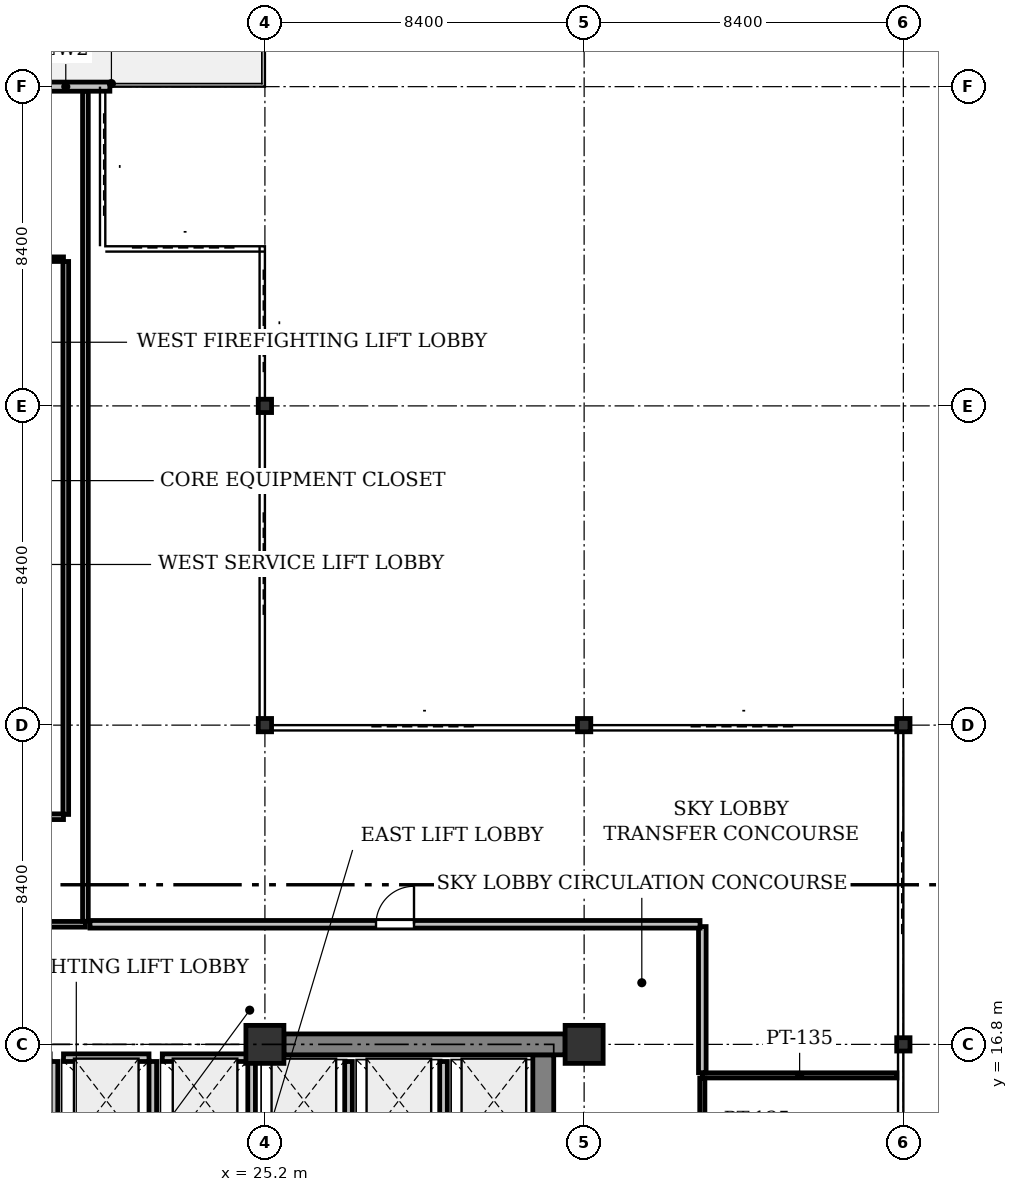
"""IFC4 building model, lengths in metres.
Left out: names, types, materials, properties, quantities, classifications, styles, units other than length and angle.
Written with IfcOpenShell. Run it as: python <this file> out.ifc"""

import sys

from ifc_helpers import new_model, si_unit, direction, frame, frame_2d, origin, origin_2d, place, context, subcontext, project, spatial, rectangle, i_section, extrude, element, fill, save


model = new_model("IFC4")
c1 = context("Model", 3, precision=1e-05, world=origin(), true_north=direction((0.0, 1.0)))
c2 = subcontext(c1, "Body", "Model", "MODEL_VIEW")
j1 = project(units=[si_unit("LENGTHUNIT", "METRE"), si_unit("PLANEANGLEUNIT", "RADIAN")], contexts=[c1])
p1 = place(None, origin())
s1 = spatial("IfcSite", under=j1, at=p1, CompositionType="ELEMENT")
p2 = place(p1, origin())
s2 = spatial("IfcBuilding", under=s1, at=p2, CompositionType="ELEMENT")
p3 = place(p2, frame((0.0, 0.0, 220.6)))
s3 = spatial("IfcBuildingStorey", under=s2, at=p3, CompositionType="ELEMENT", Elevation=220.6)
p4 = place(p3, frame((25.2, 16.8, 0.0), z_axis=(0.0, 0.0, 1.0), x_axis=(1.0, 0.0, 0.0)))
e1 = element("IfcColumn", 1, at=p4, inside=s3, PredefinedType="COLUMN", context=c2, shape_type="SweptSolid", body=[
    extrude(rectangle(XDim=1.0, YDim=1.0, at=origin_2d()), origin(), (0.0, 0.0, 1.0), 4.1),
])
for number, where, z_axis, x_axis in (
    (2, (25.2, 25.2, 0.0), (0.0, 0.0, 1.0), (1.0, 0.0, 0.0)),
    (3, (25.2, 33.6, 0.0), (0.0, 0.0, 1.0), (1.0, 0.0, 0.0)),
):
    element("IfcColumn", number, at=place(p3, frame(where, z_axis=z_axis, x_axis=x_axis)), inside=s3, PredefinedType="COLUMN", context=c2, shape_type="SweptSolid", body=[
        extrude(i_section(OverallWidth=0.35, OverallDepth=0.35, WebThickness=0.02, FlangeThickness=0.032, at=origin_2d()), origin(), (0.0, 0.0, 1.0), 4.1),
    ])
p5 = place(p3, frame((33.6, 16.8, 0.0), z_axis=(0.0, 0.0, 1.0), x_axis=(1.0, 0.0, 0.0)))
e4 = element("IfcColumn", 4, at=p5, inside=s3, PredefinedType="COLUMN", context=c2, shape_type="SweptSolid", body=[
    extrude(rectangle(XDim=1.0, YDim=1.0, at=origin_2d()), origin(), (0.0, 0.0, 1.0), 4.1),
])
for number, where, z_axis, x_axis in (
    (5, (33.6, 25.2, 0.0), (0.0, 0.0, 1.0), (1.0, 0.0, 0.0)),
    (6, (42.0, 16.8, 0.0), (0.0, 0.0, 1.0), (1.0, 0.0, 0.0)),
    (7, (42.0, 25.2, 0.0), (0.0, 0.0, 1.0), (1.0, 0.0, 0.0)),
):
    element("IfcColumn", number, at=place(p3, frame(where, z_axis=z_axis, x_axis=x_axis)), inside=s3, PredefinedType="COLUMN", context=c2, shape_type="SweptSolid", body=[
        extrude(i_section(OverallWidth=0.35, OverallDepth=0.35, WebThickness=0.02, FlangeThickness=0.032, at=origin_2d()), origin(), (0.0, 0.0, 1.0), 4.1),
    ])
p6 = place(p3, frame((17.3, 42.0, 0.0), z_axis=(0.0, 0.0, 1.0), x_axis=(1.0, 0.0, 0.0)))
e8 = element("IfcWall", 8, at=p6, inside=s3, PredefinedType="STANDARD", context=c2, shape_type="SweptSolid", body=[
    extrude(rectangle(XDim=3.82, YDim=0.24, at=frame_2d((1.91, 0.0))), origin(), (0.0, 0.0, 1.0), 3.825),
])
p7 = place(p6, frame((0.3, 0.0, 0.0)))
e9 = element("IfcOpeningElement", 9, at=p7, cuts=e8, PredefinedType="OPENING", context=c2, shape_type="SweptSolid", body=[
    extrude(rectangle(XDim=1.2, YDim=2.2, at=frame_2d((0.6, 1.1))), frame((0.0, 0.13, 0.0), z_axis=(0.0, -1.0, 0.0), x_axis=(1.0, 0.0, 0.0)), (0.0, 0.0, 1.0), 0.26),
])
p8 = place(p3, frame((32.525, 8.675, 0.0), z_axis=(0.0, 0.0, 1.0), x_axis=(0.0, 1.0, 0.0)))
e10 = element("IfcWall", 10, at=p8, inside=s3, PredefinedType="SHEAR", context=c2, shape_type="SweptSolid", body=[
    extrude(rectangle(XDim=7.85, YDim=0.55, at=frame_2d((3.925, 0.0))), origin(), (0.0, 0.0, 1.0), 3.825),
])
p9 = place(p8, frame((4.025, 0.0, 0.0)))
e11 = element("IfcOpeningElement", 11, at=p9, cuts=e10, PredefinedType="OPENING", context=c2, shape_type="SweptSolid", body=[
    extrude(rectangle(XDim=1.1, YDim=2.15, at=frame_2d((0.55, 1.075))), frame((0.0, 0.285, 0.0), z_axis=(0.0, -1.0, 0.0), x_axis=(1.0, 0.0, 0.0)), (0.0, 0.0, 1.0), 0.57),
])
p10 = place(p3, frame((25.7, 16.8, 0.0), z_axis=(0.0, 0.0, 1.0), x_axis=(1.0, 0.0, 0.0)))
e12 = element("IfcWall", 12, at=p10, inside=s3, PredefinedType="SHEAR", context=c2, shape_type="SweptSolid", body=[
    extrude(rectangle(XDim=7.4, YDim=0.55, at=frame_2d((3.7, 0.0))), origin(), (0.0, 0.0, 1.0), 3.825),
])
for number, where, z_axis, x_axis in (
    (13, (19.65, 14.3, 0.0), (0.0, 0.0, 1.0), (0.0, 1.0, 0.0)),
    (14, (22.25, 14.3, 0.0), (0.0, 0.0, 1.0), (0.0, 1.0, 0.0)),
):
    element("IfcWall", number, at=place(p3, frame(where, z_axis=z_axis, x_axis=x_axis)), inside=s3, PredefinedType="PARTITIONING", context=c2, shape_type="SweptSolid", body=[
        extrude(rectangle(XDim=2.05, YDim=0.2, at=frame_2d((1.025, 0.0))), origin(), (0.0, 0.0, 1.0), 3.825),
    ])
p11 = place(p3, frame((19.9, 16.45, 0.0), z_axis=(0.0, 0.0, 1.0), x_axis=(1.0, 0.0, 0.0)))
e15 = element("IfcWall", 15, at=p11, inside=s3, PredefinedType="PARTITIONING", context=c2, shape_type="SweptSolid", body=[
    extrude(rectangle(XDim=2.25, YDim=0.2, at=frame_2d((1.125, 0.0))), origin(), (0.0, 0.0, 1.0), 3.825),
])
p12 = place(p3, frame((24.85, 14.3, 0.0), z_axis=(0.0, 0.0, 1.0), x_axis=(0.0, 1.0, 0.0)))
e16 = element("IfcWall", 16, at=p12, inside=s3, PredefinedType="PARTITIONING", context=c2, shape_type="SweptSolid", body=[
    extrude(rectangle(XDim=2.05, YDim=0.2, at=frame_2d((1.025, 0.0))), origin(), (0.0, 0.0, 1.0), 3.825),
])
p13 = place(p3, frame((22.5, 16.45, 0.0), z_axis=(0.0, 0.0, 1.0), x_axis=(1.0, 0.0, 0.0)))
e17 = element("IfcWall", 17, at=p13, inside=s3, PredefinedType="PARTITIONING", context=c2, shape_type="SweptSolid", body=[
    extrude(rectangle(XDim=2.25, YDim=0.2, at=frame_2d((1.125, 0.0))), origin(), (0.0, 0.0, 1.0), 3.825),
])
for number, where, z_axis, x_axis in (
    (18, (27.4, 14.3, 0.0), (0.0, 0.0, 1.0), (0.0, 1.0, 0.0)),
    (19, (29.9, 14.3, 0.0), (0.0, 0.0, 1.0), (0.0, 1.0, 0.0)),
):
    element("IfcWall", number, at=place(p3, frame(where, z_axis=z_axis, x_axis=x_axis)), inside=s3, PredefinedType="PARTITIONING", context=c2, shape_type="SweptSolid", body=[
        extrude(rectangle(XDim=2.05, YDim=0.2, at=frame_2d((1.025, 0.0))), origin(), (0.0, 0.0, 1.0), 3.825),
    ])
p14 = place(p3, frame((41.831, 15.984, 0.0), z_axis=(0.0, 0.0, 1.0), x_axis=(-1.0, 0.0, 0.0)))
e20 = element("IfcWall", 20, at=p14, inside=s3, PredefinedType="PARTITIONING", context=c2, shape_type="SweptSolid", body=[
    extrude(rectangle(XDim=5.121, YDim=0.135, at=frame_2d((2.561, 0.0))), origin(), (0.0, 0.0, 1.0), 3.518),
])
p15 = place(p3, frame((36.71, 15.913, 0.0), z_axis=(0.0, 0.0, 1.0), x_axis=(0.0, -1.0, 0.0)))
e21 = element("IfcWall", 21, at=p15, inside=s3, PredefinedType="PARTITIONING", context=c2, shape_type="SweptSolid", body=[
    extrude(rectangle(XDim=5.404, YDim=0.135, at=frame_2d((2.702, 0.0))), origin(), (0.0, 0.0, 1.0), 3.825),
])
p16 = place(p15, frame((2.227, 0.0, 0.0)))
e22 = element("IfcOpeningElement", 22, at=p16, cuts=e21, PredefinedType="OPENING", context=c2, shape_type="SweptSolid", body=[
    extrude(rectangle(XDim=0.95, YDim=2.15, at=frame_2d((0.475, 1.075))), frame((0.0, 0.077, 0.0), z_axis=(0.0, -1.0, 0.0), x_axis=(1.0, 0.0, 0.0)), (0.0, 0.0, 1.0), 0.155),
])
p17 = place(p3, frame((7.774, 19.96, 0.0), z_axis=(0.0, 0.0, 1.0), x_axis=(1.0, 0.0, 0.0)))
e23 = element("IfcWall", 23, at=p17, inside=s3, PredefinedType="PARTITIONING", context=c2, shape_type="SweptSolid", body=[
    extrude(rectangle(XDim=12.703, YDim=0.15, at=frame_2d((6.352, 0.0))), origin(), (0.0, 0.0, 1.0), 3.371),
])
p18 = place(p17, frame((5.876, 0.0, 0.0)))
e24 = element("IfcOpeningElement", 24, at=p18, cuts=e23, PredefinedType="OPENING", context=c2, shape_type="SweptSolid", body=[
    extrude(rectangle(XDim=0.95, YDim=2.15, at=frame_2d((0.475, 1.075))), frame((0.0, 0.085, 0.0), z_axis=(0.0, -1.0, 0.0), x_axis=(1.0, 0.0, 0.0)), (0.0, 0.0, 1.0), 0.17),
])
p19 = place(p3, frame((20.477, 20.039, 0.0), z_axis=(0.0, 0.0, 1.0), x_axis=(0.0, 1.0, 0.0)))
e25 = element("IfcWall", 25, at=p19, inside=s3, PredefinedType="PARTITIONING", context=c2, shape_type="SweptSolid", body=[
    extrude(rectangle(XDim=21.837, YDim=0.15, at=frame_2d((10.918, 0.0))), origin(), (0.0, 0.0, 1.0), 3.365),
])
p20 = place(p3, frame((17.6, 37.46, 0.0), z_axis=(0.0, 0.0, 1.0), x_axis=(1.0, 0.0, 0.0)))
e26 = element("IfcWall", 26, at=p20, inside=s3, PredefinedType="PARTITIONING", context=c2, shape_type="SweptSolid", body=[
    extrude(rectangle(XDim=2.3, YDim=0.12, at=frame_2d((1.15, 0.0))), origin(), (0.0, 0.0, 1.0), 3.825),
])
p21 = place(p3, frame((19.96, 37.4, 0.0), z_axis=(0.0, 0.0, 1.0), x_axis=(0.0, -1.0, 0.0)))
e27 = element("IfcWall", 27, at=p21, inside=s3, PredefinedType="PARTITIONING", context=c2, shape_type="SweptSolid", body=[
    extrude(rectangle(XDim=14.55, YDim=0.15, at=frame_2d((7.275, 0.0))), origin(), (0.0, 0.0, 1.0), 3.365),
])
p22 = place(p3, frame((19.9, 22.79, 0.0), z_axis=(0.0, 0.0, 1.0), x_axis=(-1.0, 0.0, 0.0)))
e28 = element("IfcWall", 28, at=p22, inside=s3, PredefinedType="PARTITIONING", context=c2, shape_type="SweptSolid", body=[
    extrude(rectangle(XDim=12.126, YDim=0.15, at=frame_2d((6.063, 0.0))), origin(), (0.0, 0.0, 1.0), 3.371),
])
p23 = place(p3, frame((36.71, 19.9, 0.0), z_axis=(0.0, 0.0, 1.0), x_axis=(0.0, -1.0, 0.0)))
e29 = element("IfcWall", 29, at=p23, inside=s3, PredefinedType="PARTITIONING", context=c2, shape_type="SweptSolid", body=[
    extrude(rectangle(XDim=3.844, YDim=0.2, at=frame_2d((1.922, 0.0))), origin(), (0.0, 0.0, 1.0), 3.365),
])
p24 = place(p3, frame((20.597, 19.96, 0.0), z_axis=(0.0, 0.0, 1.0), x_axis=(1.0, 0.0, 0.0)))
e30 = element("IfcWall", 30, at=p24, inside=s3, PredefinedType="PARTITIONING", context=c2, shape_type="SweptSolid", body=[
    extrude(rectangle(XDim=16.053, YDim=0.2, at=frame_2d((8.027, 0.0))), origin(), (0.0, 0.0, 1.0), 3.371),
])
p25 = place(p24, frame((7.527, 0.0, 0.0)))
e31 = element("IfcOpeningElement", 31, at=p25, cuts=e30, PredefinedType="OPENING", context=c2, shape_type="SweptSolid", body=[
    extrude(rectangle(XDim=1.0, YDim=2.15, at=frame_2d((0.5, 1.075))), frame((0.0, 0.11, 0.0), z_axis=(0.0, -1.0, 0.0), x_axis=(1.0, 0.0, 0.0)), (0.0, 0.0, 1.0), 0.22),
])
p26 = place(p25, origin())
e32 = element("IfcDoor", 32, at=p26, inside=s3, OperationType="SINGLE_SWING_RIGHT", PredefinedType="DOOR", context=c2, shape_type="SweptSolid", body=[
    extrude(rectangle(XDim=1.0, YDim=2.15, at=frame_2d((0.5, 1.075))), frame((0.0, 0.025, 0.0), z_axis=(0.0, -1.0, 0.0), x_axis=(1.0, 0.0, 0.0)), (0.0, 0.0, 1.0), 0.05),
])
fill(e31, e32)
save(model, sys.argv[1])
